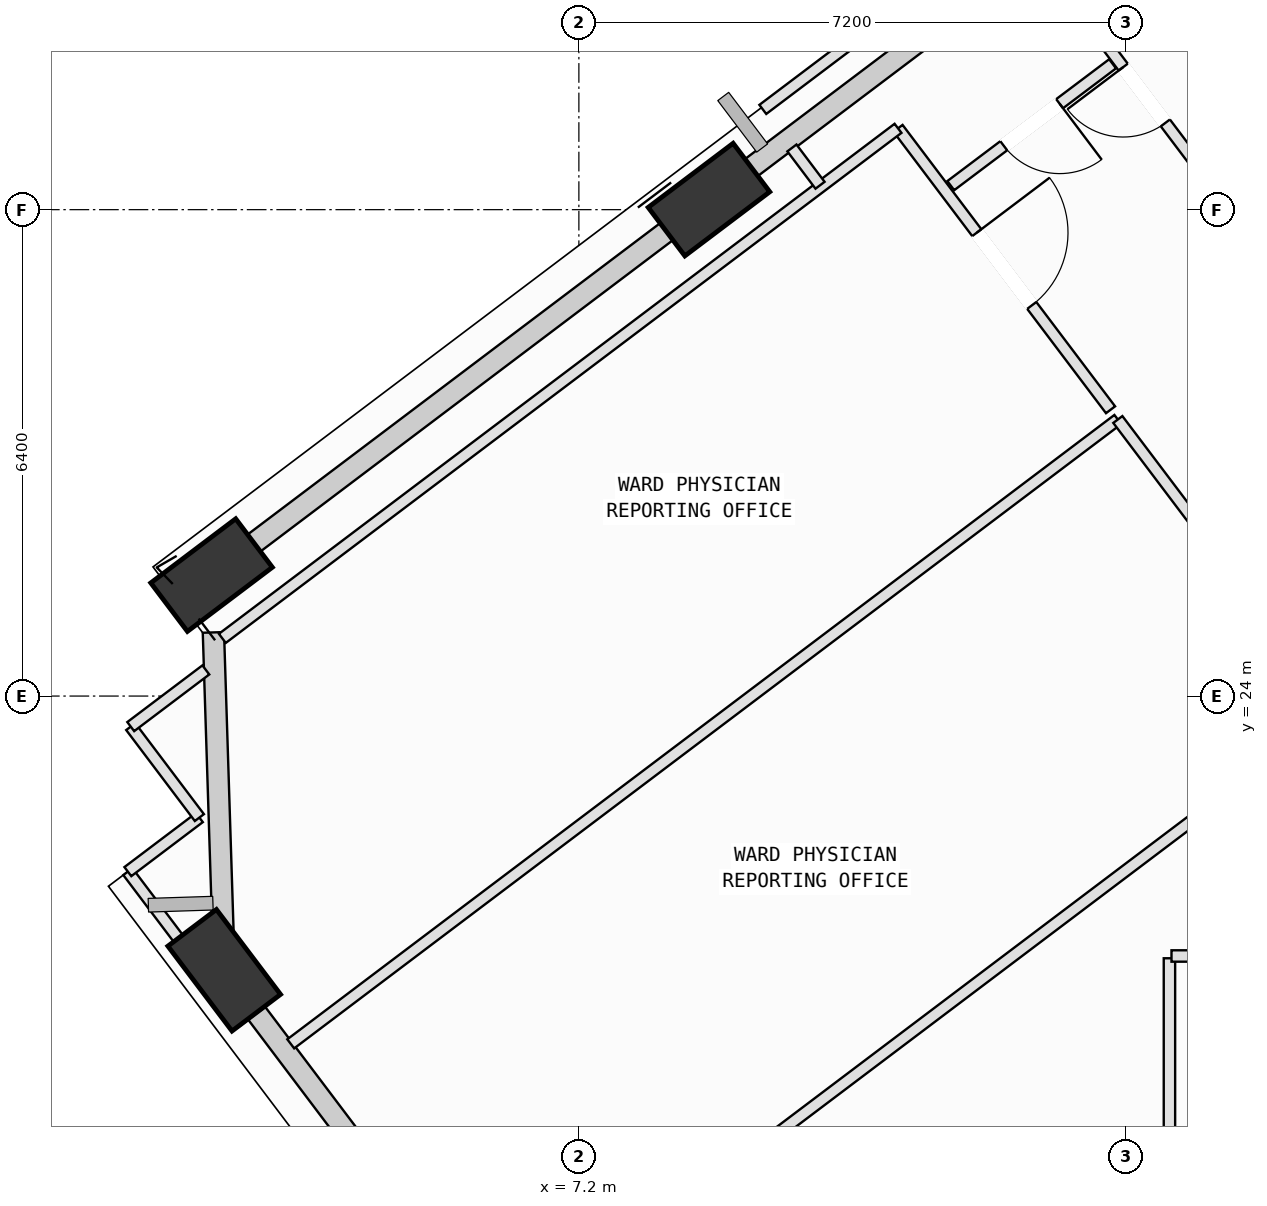
"""IFC4 building model, lengths in metres.
Left out: names, types, materials, properties, quantities, classifications, styles, units other than length and angle.
Written with IfcOpenShell. Run it as: python <this file> out.ifc"""

import sys

from ifc_helpers import new_model, si_unit, direction, frame, frame_2d, origin, origin_2d, place, context, subcontext, project, spatial, rectangle, extrude, element, fill, save


model = new_model("IFC4")
c1 = context("Model", 3, precision=1e-05, world=origin(), true_north=direction((0.0, 1.0)))
c2 = subcontext(c1, "Body", "Model", "MODEL_VIEW")
j1 = project(units=[si_unit("LENGTHUNIT", "METRE"), si_unit("PLANEANGLEUNIT", "RADIAN")], contexts=[c1])
p1 = place(None, origin())
s1 = spatial("IfcSite", under=j1, at=p1, CompositionType="ELEMENT")
p2 = place(p1, origin())
s2 = spatial("IfcBuilding", under=s1, at=p2, CompositionType="ELEMENT")
p3 = place(p2, frame((0.0, 0.0, 181.8)))
s3 = spatial("IfcBuildingStorey", under=s2, at=p3, CompositionType="ELEMENT", Elevation=181.8)
p4 = place(p3, frame((8.912, 30.532, 0.002), z_axis=(-0.022783812004, -0.101949964112, 0.994528583163), x_axis=(0.909585631227, 0.41072177351, 0.06294127605)))
e1 = element("IfcColumn", 1, at=p4, inside=s3, PredefinedType="COLUMN", context=c2, shape_type="SweptSolid", body=[
    extrude(rectangle(XDim=1.4, YDim=0.8, at=origin_2d()), origin(), (0.0, 0.0, 1.0), 4.018),
])
p5 = place(p3, frame((2.367, 25.592, 0.002), z_axis=(-0.002181074788, -0.128380485457, 0.991722589168), x_axis=(0.808144834717, 0.583881033112, 0.077361911126)))
e2 = element("IfcColumn", 2, at=p5, inside=s3, PredefinedType="COLUMN", context=c2, shape_type="SweptSolid", body=[
    extrude(rectangle(XDim=1.4, YDim=0.8, at=origin_2d()), origin(), (0.0, 0.0, 1.0), 4.03),
])
p6 = place(p3, frame((2.534, 20.392, 0.002), z_axis=(0.019204163449, -0.127522915018, 0.991649689281), x_axis=(-0.713651640755, 0.692898113321, 0.102924925082)))
e3 = element("IfcColumn", 3, at=p6, inside=s3, PredefinedType="COLUMN", context=c2, shape_type="SweptSolid", body=[
    extrude(rectangle(XDim=1.4, YDim=0.8, at=origin_2d()), origin(), (0.0, 0.0, 1.0), 4.03),
])
p7 = place(p3, frame((9.165, 30.723, 0.0), z_axis=(0.0, 0.0, 1.0), x_axis=(0.798107969136, 0.602514455928, 0.0)))
e4 = element("IfcWall", 4, at=p7, inside=s3, PredefinedType="SOLIDWALL", context=c2, shape_type="SweptSolid", body=[
    extrude(rectangle(XDim=7.231, YDim=0.28, at=frame_2d((3.615, 0.0))), origin(), (0.0, 0.0, 1.0), 3.265),
])
p8 = place(p3, frame((2.601, 25.768, 0.0), z_axis=(0.0, 0.0, 1.0), x_axis=(0.798118156469, 0.602500961256, 0.0)))
e5 = element("IfcWall", 5, at=p8, inside=s3, PredefinedType="SOLIDWALL", context=c2, shape_type="SweptSolid", body=[
    extrude(rectangle(XDim=7.27, YDim=0.28, at=frame_2d((3.635, 0.0))), origin(), (0.0, 0.0, 1.0), 3.265),
])
p9 = place(p3, frame((2.526, 20.629, 0.0), z_axis=(0.0, 0.0, 1.0), x_axis=(-0.031949799886, 0.999489474826, 0.0)))
e6 = element("IfcWall", 6, at=p9, inside=s3, PredefinedType="SOLIDWALL", context=c2, shape_type="SweptSolid", body=[
    extrude(rectangle(XDim=4.21, YDim=0.28, at=frame_2d((2.105, 0.0))), origin(), (0.0, 0.0, 1.0), 3.265),
])
p10 = place(p3, frame((6.352, 15.335, 0.0), z_axis=(0.0, 0.0, 1.0), x_axis=(-0.602530491205, 0.798095863395, 0.0)))
e7 = element("IfcWall", 7, at=p10, inside=s3, PredefinedType="SOLIDWALL", context=c2, shape_type="SweptSolid", body=[
    extrude(rectangle(XDim=5.628, YDim=0.28, at=frame_2d((2.814, 0.0))), origin(), (0.0, 0.0, 1.0), 3.265),
])
p11 = place(p10, frame((1.817, 0.0, 0.75)))
e8 = element("IfcOpeningElement", 8, at=p11, cuts=e7, PredefinedType="OPENING", context=c2, shape_type="SweptSolid", body=[
    extrude(rectangle(XDim=1.8, YDim=2.05, at=frame_2d((0.9, 1.025))), frame((0.0, 0.15, 0.0), z_axis=(0.0, -1.0, 0.0), x_axis=(1.0, 0.0, 0.0)), (0.0, 0.0, 1.0), 0.3),
])
p12 = place(p3, frame((14.97, 20.55, 0.0), z_axis=(0.0, 0.0, 1.0), x_axis=(0.0, -1.0, 0.0)))
e9 = element("IfcWall", 9, at=p12, inside=s3, PredefinedType="PARTITIONING", context=c2, shape_type="SweptSolid", body=[
    extrude(rectangle(XDim=2.32, YDim=0.15, at=frame_2d((1.16, 0.0))), origin(), (0.0, 0.0, 1.0), 3.78),
])
p13 = place(p3, frame((6.301, 15.593, 0.0), z_axis=(0.0, 0.0, 1.0), x_axis=(0.798111656514, 0.60250957149, 0.0)))
e10 = element("IfcWall", 10, at=p13, inside=s3, PredefinedType="PARTITIONING", context=c2, shape_type="SweptSolid", body=[
    extrude(rectangle(XDim=13.635, YDim=0.15, at=frame_2d((6.817, 0.0))), origin(), (0.0, 0.0, 1.0), 3.78),
])
p14 = place(p3, frame((19.62, 20.58, 0.0), z_axis=(0.0, 0.0, 1.0), x_axis=(-1.0, 0.0, 0.0)))
e11 = element("IfcWall", 11, at=p14, inside=s3, PredefinedType="PARTITIONING", context=c2, shape_type="SweptSolid", body=[
    extrude(rectangle(XDim=4.623, YDim=0.15, at=frame_2d((2.312, 0.0))), origin(), (0.0, 0.0, 1.0), 3.78),
])
p15 = place(p14, frame((1.711, 0.0, 0.0)))
e12 = element("IfcOpeningElement", 12, at=p15, cuts=e11, PredefinedType="OPENING", context=c2, shape_type="SweptSolid", body=[
    extrude(rectangle(XDim=1.2, YDim=2.15, at=frame_2d((0.6, 1.075))), frame((0.0, 0.085, 0.0), z_axis=(0.0, -1.0, 0.0), x_axis=(1.0, 0.0, 0.0)), (0.0, 0.0, 1.0), 0.17),
])
p16 = place(p3, frame((3.409, 19.424, 0.0), z_axis=(0.0, 0.0, 1.0), x_axis=(0.798120266847, 0.60249816568, 0.0)))
e13 = element("IfcWall", 13, at=p16, inside=s3, PredefinedType="PARTITIONING", context=c2, shape_type="SweptSolid", body=[
    extrude(rectangle(XDim=13.635, YDim=0.15, at=frame_2d((6.817, 0.0))), origin(), (0.0, 0.0, 1.0), 3.78),
])
p17 = place(p3, frame((14.291, 27.639, 0.0), z_axis=(0.0, 0.0, 1.0), x_axis=(0.602581465391, -0.798057377365, 0.0)))
e14 = element("IfcWall", 14, at=p17, inside=s3, PredefinedType="PARTITIONING", context=c2, shape_type="SweptSolid", body=[
    extrude(rectangle(XDim=4.64, YDim=0.15, at=frame_2d((2.32, 0.0))), origin(), (0.0, 0.0, 1.0), 3.78),
])
p18 = place(p17, frame((1.72, 0.0, 0.0)))
e15 = element("IfcOpeningElement", 15, at=p18, cuts=e14, PredefinedType="OPENING", context=c2, shape_type="SweptSolid", body=[
    extrude(rectangle(XDim=1.2, YDim=2.15, at=frame_2d((0.6, 1.075))), frame((0.0, 0.085, 0.0), z_axis=(0.0, -1.0, 0.0), x_axis=(1.0, 0.0, 0.0)), (0.0, 0.0, 1.0), 0.17),
])
p19 = place(p3, frame((11.399, 31.47, 0.0), z_axis=(0.0, 0.0, 1.0), x_axis=(0.602614975976, -0.798032073747, 0.0)))
e16 = element("IfcWall", 16, at=p19, inside=s3, PredefinedType="PARTITIONING", context=c2, shape_type="SweptSolid", body=[
    extrude(rectangle(XDim=4.64, YDim=0.15, at=frame_2d((2.32, 0.0))), origin(), (0.0, 0.0, 1.0), 3.78),
])
p20 = place(p19, frame((1.72, 0.0, 0.0)))
e17 = element("IfcOpeningElement", 17, at=p20, cuts=e16, PredefinedType="OPENING", context=c2, shape_type="SweptSolid", body=[
    extrude(rectangle(XDim=1.2, YDim=2.15, at=frame_2d((0.6, 1.075))), frame((0.0, 0.085, 0.0), z_axis=(0.0, -1.0, 0.0), x_axis=(1.0, 0.0, 0.0)), (0.0, 0.0, 1.0), 0.17),
])
p21 = place(p3, frame((2.777, 19.688, 0.0), z_axis=(0.0, 0.0, 1.0), x_axis=(-0.602426797269, 0.798174137599, 0.0)))
e18 = element("IfcWall", 18, at=p21, inside=s3, PredefinedType="PARTITIONING", context=c2, shape_type="SweptSolid", body=[
    extrude(rectangle(XDim=2.508, YDim=0.15, at=frame_2d((1.254, 0.0))), origin(), (0.0, 0.0, 1.0), 3.265),
])
p22 = place(p3, frame((1.266, 21.69, 0.0), z_axis=(0.0, 0.0, 1.0), x_axis=(0.797858472896, 0.6028448036, 0.0)))
e19 = element("IfcWall", 19, at=p22, inside=s3, PredefinedType="PARTITIONING", context=c2, shape_type="SweptSolid", body=[
    extrude(rectangle(XDim=1.179, YDim=0.15, at=frame_2d((0.59, 0.0))), origin(), (0.0, 0.0, 1.0), 3.78),
])
p23 = place(p3, frame((2.207, 22.401, 0.0), z_axis=(0.0, 0.0, 1.0), x_axis=(-0.602264019624, 0.79829696897, 0.0)))
e20 = element("IfcWall", 20, at=p23, inside=s3, PredefinedType="PARTITIONING", context=c2, shape_type="SweptSolid", body=[
    extrude(rectangle(XDim=1.5, YDim=0.15, at=frame_2d((0.75, 0.0))), origin(), (0.0, 0.0, 1.0), 3.78),
])
p24 = place(p3, frame((1.304, 23.598, 0.0), z_axis=(0.0, 0.0, 1.0), x_axis=(0.79803169235, 0.602615481053, 0.0)))
e21 = element("IfcWall", 21, at=p24, inside=s3, PredefinedType="PARTITIONING", context=c2, shape_type="SweptSolid", body=[
    extrude(rectangle(XDim=1.238, YDim=0.15, at=frame_2d((0.619, 0.0))), origin(), (0.0, 0.0, 1.0), 3.78),
])
p25 = place(p3, frame((2.509, 24.759, 0.0), z_axis=(0.0, 0.0, 1.0), x_axis=(0.798120739774, 0.6024975392, 0.0)))
e22 = element("IfcWall", 22, at=p25, inside=s3, PredefinedType="PARTITIONING", context=c2, shape_type="SweptSolid", body=[
    extrude(rectangle(XDim=11.138, YDim=0.15, at=frame_2d((5.569, 0.0))), origin(), (0.0, 0.0, 1.0), 3.265),
])
p26 = place(p3, frame((15.987, 30.123, 0.0), z_axis=(0.0, 0.0, 1.0), x_axis=(-0.602537420483, 0.79809063202, 0.0)))
e23 = element("IfcWall", 23, at=p26, inside=s3, PredefinedType="PARTITIONING", context=c2, shape_type="SweptSolid", body=[
    extrude(rectangle(XDim=4.474, YDim=0.15, at=frame_2d((2.237, 0.0))), origin(), (0.0, 0.0, 1.0), 3.78),
])
p27 = place(p26, frame((1.777, 0.0, 0.0)))
e24 = element("IfcOpeningElement", 24, at=p27, cuts=e23, PredefinedType="OPENING", context=c2, shape_type="SweptSolid", body=[
    extrude(rectangle(XDim=0.92, YDim=2.1, at=frame_2d((0.46, 1.05))), frame((0.0, 0.085, 0.0), z_axis=(0.0, -1.0, 0.0), x_axis=(1.0, 0.0, 0.0)), (0.0, 0.0, 1.0), 0.17),
])
p28 = place(p3, frame((10.373, 30.721, 0.0), z_axis=(0.0, 0.0, 1.0), x_axis=(-0.60196768023, 0.79852045181, 0.0)))
e25 = element("IfcWall", 25, at=p28, inside=s3, PredefinedType="PARTITIONING", context=c2, shape_type="SweptSolid", body=[
    extrude(rectangle(XDim=0.615, YDim=0.15, at=frame_2d((0.307, 0.0))), origin(), (0.0, 0.0, 1.0), 3.78),
])
p29 = place(p3, frame((9.62, 31.719, 0.0), z_axis=(0.0, 0.0, 1.0), x_axis=(0.798122768772, 0.602494851404, 0.0)))
e26 = element("IfcWall", 26, at=p29, inside=s3, PredefinedType="PARTITIONING", context=c2, shape_type="SweptSolid", body=[
    extrude(rectangle(XDim=5.74, YDim=0.15, at=frame_2d((2.87, 0.0))), origin(), (0.0, 0.0, 1.0), 3.78),
])
p30 = place(p3, frame((14.222, 32.319, 0.0), z_axis=(0.0, 0.0, 1.0), x_axis=(-0.798855231842, -0.601523331683, 0.0)))
e27 = element("IfcWall", 27, at=p30, inside=s3, PredefinedType="PARTITIONING", context=c2, shape_type="SweptSolid", body=[
    extrude(rectangle(XDim=2.665, YDim=0.15, at=frame_2d((1.333, 0.0))), origin(), (0.0, 0.0, 1.0), 3.78),
])
p31 = place(p30, frame((0.873, 0.0, 0.0)))
e28 = element("IfcOpeningElement", 28, at=p31, cuts=e27, PredefinedType="OPENING", context=c2, shape_type="SweptSolid", body=[
    extrude(rectangle(XDim=0.92, YDim=2.1, at=frame_2d((0.46, 1.05))), frame((0.0, 0.085, 0.0), z_axis=(0.0, -1.0, 0.0), x_axis=(1.0, 0.0, 0.0)), (0.0, 0.0, 1.0), 0.17),
])
p32 = place(p20, origin())
e29 = element("IfcDoor", 29, at=p32, inside=s3, OperationType="SINGLE_SWING_LEFT", PredefinedType="DOOR", context=c2, shape_type="SweptSolid", body=[
    extrude(rectangle(XDim=1.2, YDim=2.15, at=frame_2d((0.6, 1.075))), frame((0.0, 0.025, 0.0), z_axis=(0.0, -1.0, 0.0), x_axis=(1.0, 0.0, 0.0)), (0.0, 0.0, 1.0), 0.05),
])
fill(e17, e29)
p33 = place(p27, origin())
e30 = element("IfcDoor", 30, at=p33, inside=s3, OperationType="SINGLE_SWING_RIGHT", PredefinedType="DOOR", context=c2, shape_type="SweptSolid", body=[
    extrude(rectangle(XDim=0.92, YDim=2.1, at=frame_2d((0.46, 1.05))), frame((0.0, 0.025, 0.0), z_axis=(0.0, -1.0, 0.0), x_axis=(1.0, 0.0, 0.0)), (0.0, 0.0, 1.0), 0.05),
])
fill(e24, e30)
p34 = place(p31, origin())
e31 = element("IfcDoor", 31, at=p34, inside=s3, OperationType="SINGLE_SWING_LEFT", PredefinedType="DOOR", context=c2, shape_type="SweptSolid", body=[
    extrude(rectangle(XDim=0.92, YDim=2.1, at=frame_2d((0.46, 1.05))), frame((0.0, 0.025, 0.0), z_axis=(0.0, -1.0, 0.0), x_axis=(1.0, 0.0, 0.0)), (0.0, 0.0, 1.0), 0.05),
])
fill(e28, e31)
save(model, sys.argv[1])
